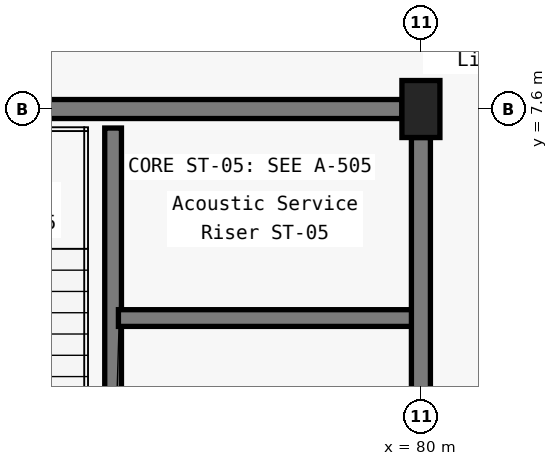
"""IFC4 building model, lengths in metres.
Left out: names, types, materials, properties, quantities, classifications, styles, units other than length and angle.
Written with IfcOpenShell. Run it as: python <this file> out.ifc"""

import sys

from ifc_helpers import new_model, si_unit, direction, frame, frame_2d, origin, origin_2d, place, context, subcontext, project, spatial, rectangle, extrude, element, save


model = new_model("IFC4")
c1 = context("Model", 3, precision=1e-05, world=origin(), true_north=direction((0.0, 1.0)))
c2 = subcontext(c1, "Body", "Model", "MODEL_VIEW")
j1 = project(units=[si_unit("LENGTHUNIT", "METRE"), si_unit("PLANEANGLEUNIT", "RADIAN")], contexts=[c1])
p1 = place(None, origin())
s1 = spatial("IfcSite", under=j1, at=p1, CompositionType="ELEMENT")
p2 = place(p1, origin())
s2 = spatial("IfcBuilding", under=s1, at=p2, CompositionType="ELEMENT")
p3 = place(p2, frame((0.0, 0.0, -5.4)))
s3 = spatial("IfcBuildingStorey", under=s2, at=p3, CompositionType="ELEMENT", Elevation=-5.4)
p4 = place(p3, frame((80.0, 7.6, 0.0), z_axis=(0.0, 0.0, 1.0), x_axis=(1.0, 0.0, 0.0)))
e1 = element("IfcColumn", 1, at=p4, inside=s3, PredefinedType="COLUMN", context=c2, shape_type="SweptSolid", body=[
    extrude(rectangle(XDim=0.5, YDim=0.75, at=origin_2d()), origin(), (0.0, 0.0, 1.0), 5.4),
])
p5 = place(p3, frame((72.3, 7.6, 0.0), z_axis=(0.0, 0.0, 1.0), x_axis=(1.0, 0.0, 0.0)))
e2 = element("IfcWall", 2, at=p5, inside=s3, PredefinedType="SOLIDWALL", context=c2, shape_type="SweptSolid", body=[
    extrude(rectangle(XDim=7.45, YDim=0.25, at=frame_2d((3.725, 0.0))), origin(), (0.0, 0.0, 1.0), 4.41),
])
p6 = place(p3, frame((75.95, 0.25, 0.0), z_axis=(0.0, 0.0, 1.0), x_axis=(0.0, 1.0, 0.0)))
e3 = element("IfcWall", 3, at=p6, inside=s3, PredefinedType="SOLIDWALL", context=c2, shape_type="SweptSolid", body=[
    extrude(rectangle(XDim=7.1, YDim=0.22, at=frame_2d((3.55, 0.0))), origin(), (0.0, 0.0, 1.0), 5.08),
])
p7 = place(p6, frame((0.35, 0.0, 0.0)))
e4 = element("IfcOpeningElement", 4, at=p7, cuts=e3, PredefinedType="OPENING", context=c2, shape_type="SweptSolid", body=[
    extrude(rectangle(XDim=1.2, YDim=2.15, at=frame_2d((0.6, 1.075))), frame((0.0, 0.12, 0.0), z_axis=(0.0, -1.0, 0.0), x_axis=(1.0, 0.0, 0.0)), (0.0, 0.0, 1.0), 0.24),
])
p8 = place(p3, frame((76.02, 4.85, 0.0), z_axis=(0.0, 0.0, 1.0), x_axis=(1.0, 0.0, 0.0)))
e5 = element("IfcWall", 5, at=p8, inside=s3, PredefinedType="SOLIDWALL", context=c2, shape_type="SweptSolid", body=[
    extrude(rectangle(XDim=3.93, YDim=0.22, at=frame_2d((1.965, 0.0))), origin(), (0.0, 0.0, 1.0), 4.435),
])
p9 = place(p3, frame((80.0, 0.45, 0.0), z_axis=(0.0, 0.0, 1.0), x_axis=(0.0, 1.0, 0.0)))
e6 = element("IfcWall", 6, at=p9, inside=s3, PredefinedType="SOLIDWALL", context=c2, shape_type="SweptSolid", body=[
    extrude(rectangle(XDim=6.775, YDim=0.25, at=frame_2d((3.388, 0.0))), origin(), (0.0, 0.0, 1.0), 4.435),
])
p10 = place(p9, frame((1.9, 0.0, 0.0)))
e7 = element("IfcOpeningElement", 7, at=p10, cuts=e6, PredefinedType="OPENING", context=c2, shape_type="SweptSolid", body=[
    extrude(rectangle(XDim=1.35, YDim=2.2, at=frame_2d((0.675, 1.1))), frame((0.0, 0.135, 0.0), z_axis=(0.0, -1.0, 0.0), x_axis=(1.0, 0.0, 0.0)), (0.0, 0.0, 1.0), 0.27),
])
save(model, sys.argv[1])
